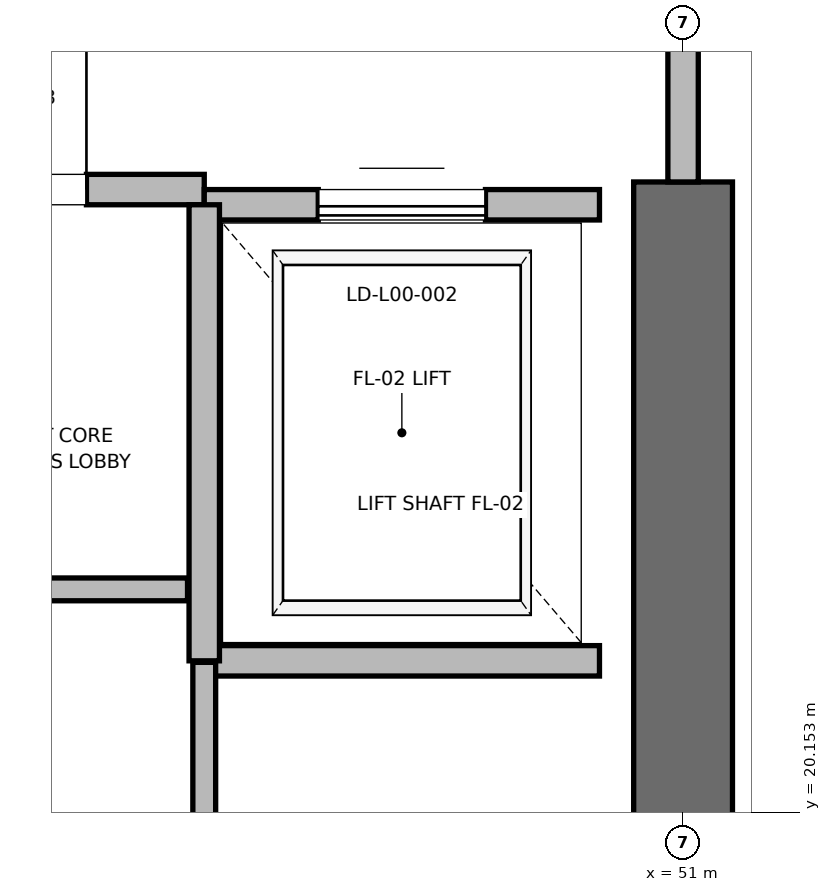
"""IFC4 building model, lengths in metres.
Left out: names, types, materials, properties, quantities, classifications, styles, units other than length and angle.
Written with IfcOpenShell. Run it as: python <this file> out.ifc"""

import sys

from ifc_helpers import new_model, si_unit, direction, frame, frame_2d, origin, place, context, subcontext, project, spatial, rectangle, extrude, element, fill, save


model = new_model("IFC4")
c1 = context("Model", 3, precision=1e-05, world=origin(), true_north=direction((0.0, 1.0)))
c2 = subcontext(c1, "Body", "Model", "MODEL_VIEW")
j1 = project(units=[si_unit("LENGTHUNIT", "METRE"), si_unit("PLANEANGLEUNIT", "RADIAN")], contexts=[c1])
p1 = place(None, origin())
s1 = spatial("IfcSite", under=j1, at=p1, CompositionType="ELEMENT")
p2 = place(p1, origin())
s2 = spatial("IfcBuilding", under=s1, at=p2, CompositionType="ELEMENT")
p3 = place(p2, origin())
s3 = spatial("IfcBuildingStorey", under=s2, at=p3, CompositionType="ELEMENT", Elevation=0.0)
p4 = place(p3, frame((51.0, 18.5, 0.0), z_axis=(0.0, 0.0, 1.0), x_axis=(0.0, 1.0, 0.0)))
e1 = element("IfcWall", 1, at=p4, inside=s3, PredefinedType="SHEAR", context=c2, shape_type="SweptSolid", body=[
    extrude(rectangle(XDim=5.8, YDim=0.65, at=frame_2d((2.9, 0.0))), origin(), (0.0, 0.0, 1.0), 5.72),
])
p5 = place(p3, frame((45.15, 24.25, 0.0), z_axis=(0.0, 0.0, 1.0), x_axis=(1.0, 0.0, 0.0)))
e2 = element("IfcWall", 2, at=p5, inside=s3, PredefinedType="PARTITIONING", context=c2, shape_type="SweptSolid", body=[
    extrude(rectangle(XDim=2.7, YDim=0.2, at=frame_2d((1.35, 0.0))), origin(), (0.0, 0.0, 1.0), 5.72),
])
p6 = place(p5, frame((0.775, 0.0, 0.0)))
e3 = element("IfcOpeningElement", 3, at=p6, cuts=e2, PredefinedType="OPENING", context=c2, shape_type="SweptSolid", body=[
    extrude(rectangle(XDim=1.15, YDim=2.2, at=frame_2d((0.575, 1.1))), frame((0.0, 0.1, 0.0), z_axis=(0.0, -1.0, 0.0), x_axis=(1.0, 0.0, 0.0)), (0.0, 0.0, 1.0), 0.2),
])
p7 = place(p3, frame((51.0, 27.7, 0.0), z_axis=(0.0, 0.0, 1.0), x_axis=(0.0, -1.0, 0.0)))
e4 = element("IfcWall", 4, at=p7, inside=s3, PredefinedType="PARTITIONING", context=c2, shape_type="SweptSolid", body=[
    extrude(rectangle(XDim=3.4, YDim=0.2, at=frame_2d((1.7, 0.0))), origin(), (0.0, 0.0, 1.0), 4.5),
])
p8 = place(p7, frame((1.125, 0.0, 0.0)))
e5 = element("IfcOpeningElement", 5, at=p8, cuts=e4, PredefinedType="OPENING", context=c2, shape_type="SweptSolid", body=[
    extrude(rectangle(XDim=1.15, YDim=2.2, at=frame_2d((0.575, 1.1))), frame((0.0, 0.1, 0.0), z_axis=(0.0, -1.0, 0.0), x_axis=(1.0, 0.0, 0.0)), (0.0, 0.0, 1.0), 0.2),
])
p9 = place(p3, frame((47.85, 21.15, 0.0), z_axis=(0.0, 0.0, 1.0), x_axis=(1.0, 0.0, 0.0)))
e6 = element("IfcWall", 6, at=p9, inside=s3, PredefinedType="SOLIDWALL", context=c2, shape_type="SweptSolid", body=[
    extrude(rectangle(XDim=2.6, YDim=0.2, at=frame_2d((1.3, 0.0))), origin(), (0.0, 0.0, 1.0), 5.72),
])
p10 = place(p3, frame((50.45, 24.15, 0.0), z_axis=(0.0, 0.0, 1.0), x_axis=(-1.0, 0.0, 0.0)))
e7 = element("IfcWall", 7, at=p10, inside=s3, PredefinedType="SOLIDWALL", context=c2, shape_type="SweptSolid", body=[
    extrude(rectangle(XDim=2.6, YDim=0.2, at=frame_2d((1.3, 0.0))), origin(), (0.0, 0.0, 1.0), 4.5),
])
p11 = place(p10, frame((0.75, 0.0, 0.0)))
e8 = element("IfcOpeningElement", 8, at=p11, cuts=e7, PredefinedType="OPENING", context=c2, shape_type="SweptSolid", body=[
    extrude(rectangle(XDim=1.1, YDim=2.2, at=frame_2d((0.55, 1.1))), frame((0.0, 0.1, 0.0), z_axis=(0.0, -1.0, 0.0), x_axis=(1.0, 0.0, 0.0)), (0.0, 0.0, 1.0), 0.2),
])
p12 = place(p3, frame((47.85, 24.15, 0.0), z_axis=(0.0, 0.0, 1.0), x_axis=(0.0, -1.0, 0.0)))
e9 = element("IfcWall", 9, at=p12, inside=s3, PredefinedType="SOLIDWALL", context=c2, shape_type="SweptSolid", body=[
    extrude(rectangle(XDim=3.0, YDim=0.2, at=frame_2d((1.5, 0.0))), origin(), (0.0, 0.0, 1.0), 5.72),
])
p13 = place(p3, frame((47.85, 18.6, 0.0), z_axis=(0.0, 0.0, 1.0), x_axis=(0.0, 1.0, 0.0)))
e10 = element("IfcWall", 10, at=p13, inside=s3, PredefinedType="PARTITIONING", context=c2, shape_type="SweptSolid", body=[
    extrude(rectangle(XDim=2.54, YDim=0.15, at=frame_2d((1.27, 0.0))), origin(), (0.0, 0.0, 1.0), 2.85),
])
p14 = place(p3, frame((41.76, 21.62, 0.0), z_axis=(0.0, 0.0, 1.0), x_axis=(1.0, 0.0, 0.0)))
e11 = element("IfcWall", 11, at=p14, inside=s3, PredefinedType="PARTITIONING", context=c2, shape_type="SweptSolid", body=[
    extrude(rectangle(XDim=5.98, YDim=0.15, at=frame_2d((2.99, 0.0))), origin(), (0.0, 0.0, 1.0), 2.85),
])
p15 = place(p14, frame((2.49, 0.0, 0.0)))
e12 = element("IfcOpeningElement", 12, at=p15, cuts=e11, PredefinedType="OPENING", context=c2, shape_type="SweptSolid", body=[
    extrude(rectangle(XDim=1.0, YDim=2.15, at=frame_2d((0.5, 1.075))), frame((0.0, 0.075, 0.0), z_axis=(0.0, -1.0, 0.0), x_axis=(1.0, 0.0, 0.0)), (0.0, 0.0, 1.0), 0.15),
])
p16 = place(p6, origin())
e13 = element("IfcDoor", 13, at=p16, inside=s3, OperationType="SINGLE_SWING_RIGHT", PredefinedType="DOOR", context=c2, shape_type="SweptSolid", body=[
    extrude(rectangle(XDim=1.15, YDim=2.2, at=frame_2d((0.575, 1.1))), frame((0.0, 0.025, 0.0), z_axis=(0.0, -1.0, 0.0), x_axis=(1.0, 0.0, 0.0)), (0.0, 0.0, 1.0), 0.05),
])
fill(e3, e13)
p17 = place(p11, origin())
e14 = element("IfcDoor", 14, at=p17, inside=s3, OperationType="SLIDING_TO_RIGHT", PredefinedType="DOOR", context=c2, shape_type="SweptSolid", body=[
    extrude(rectangle(XDim=1.1, YDim=2.2, at=frame_2d((0.55, 1.1))), frame((0.0, 0.025, 0.0), z_axis=(0.0, -1.0, 0.0), x_axis=(1.0, 0.0, 0.0)), (0.0, 0.0, 1.0), 0.05),
])
fill(e8, e14)
save(model, sys.argv[1])
